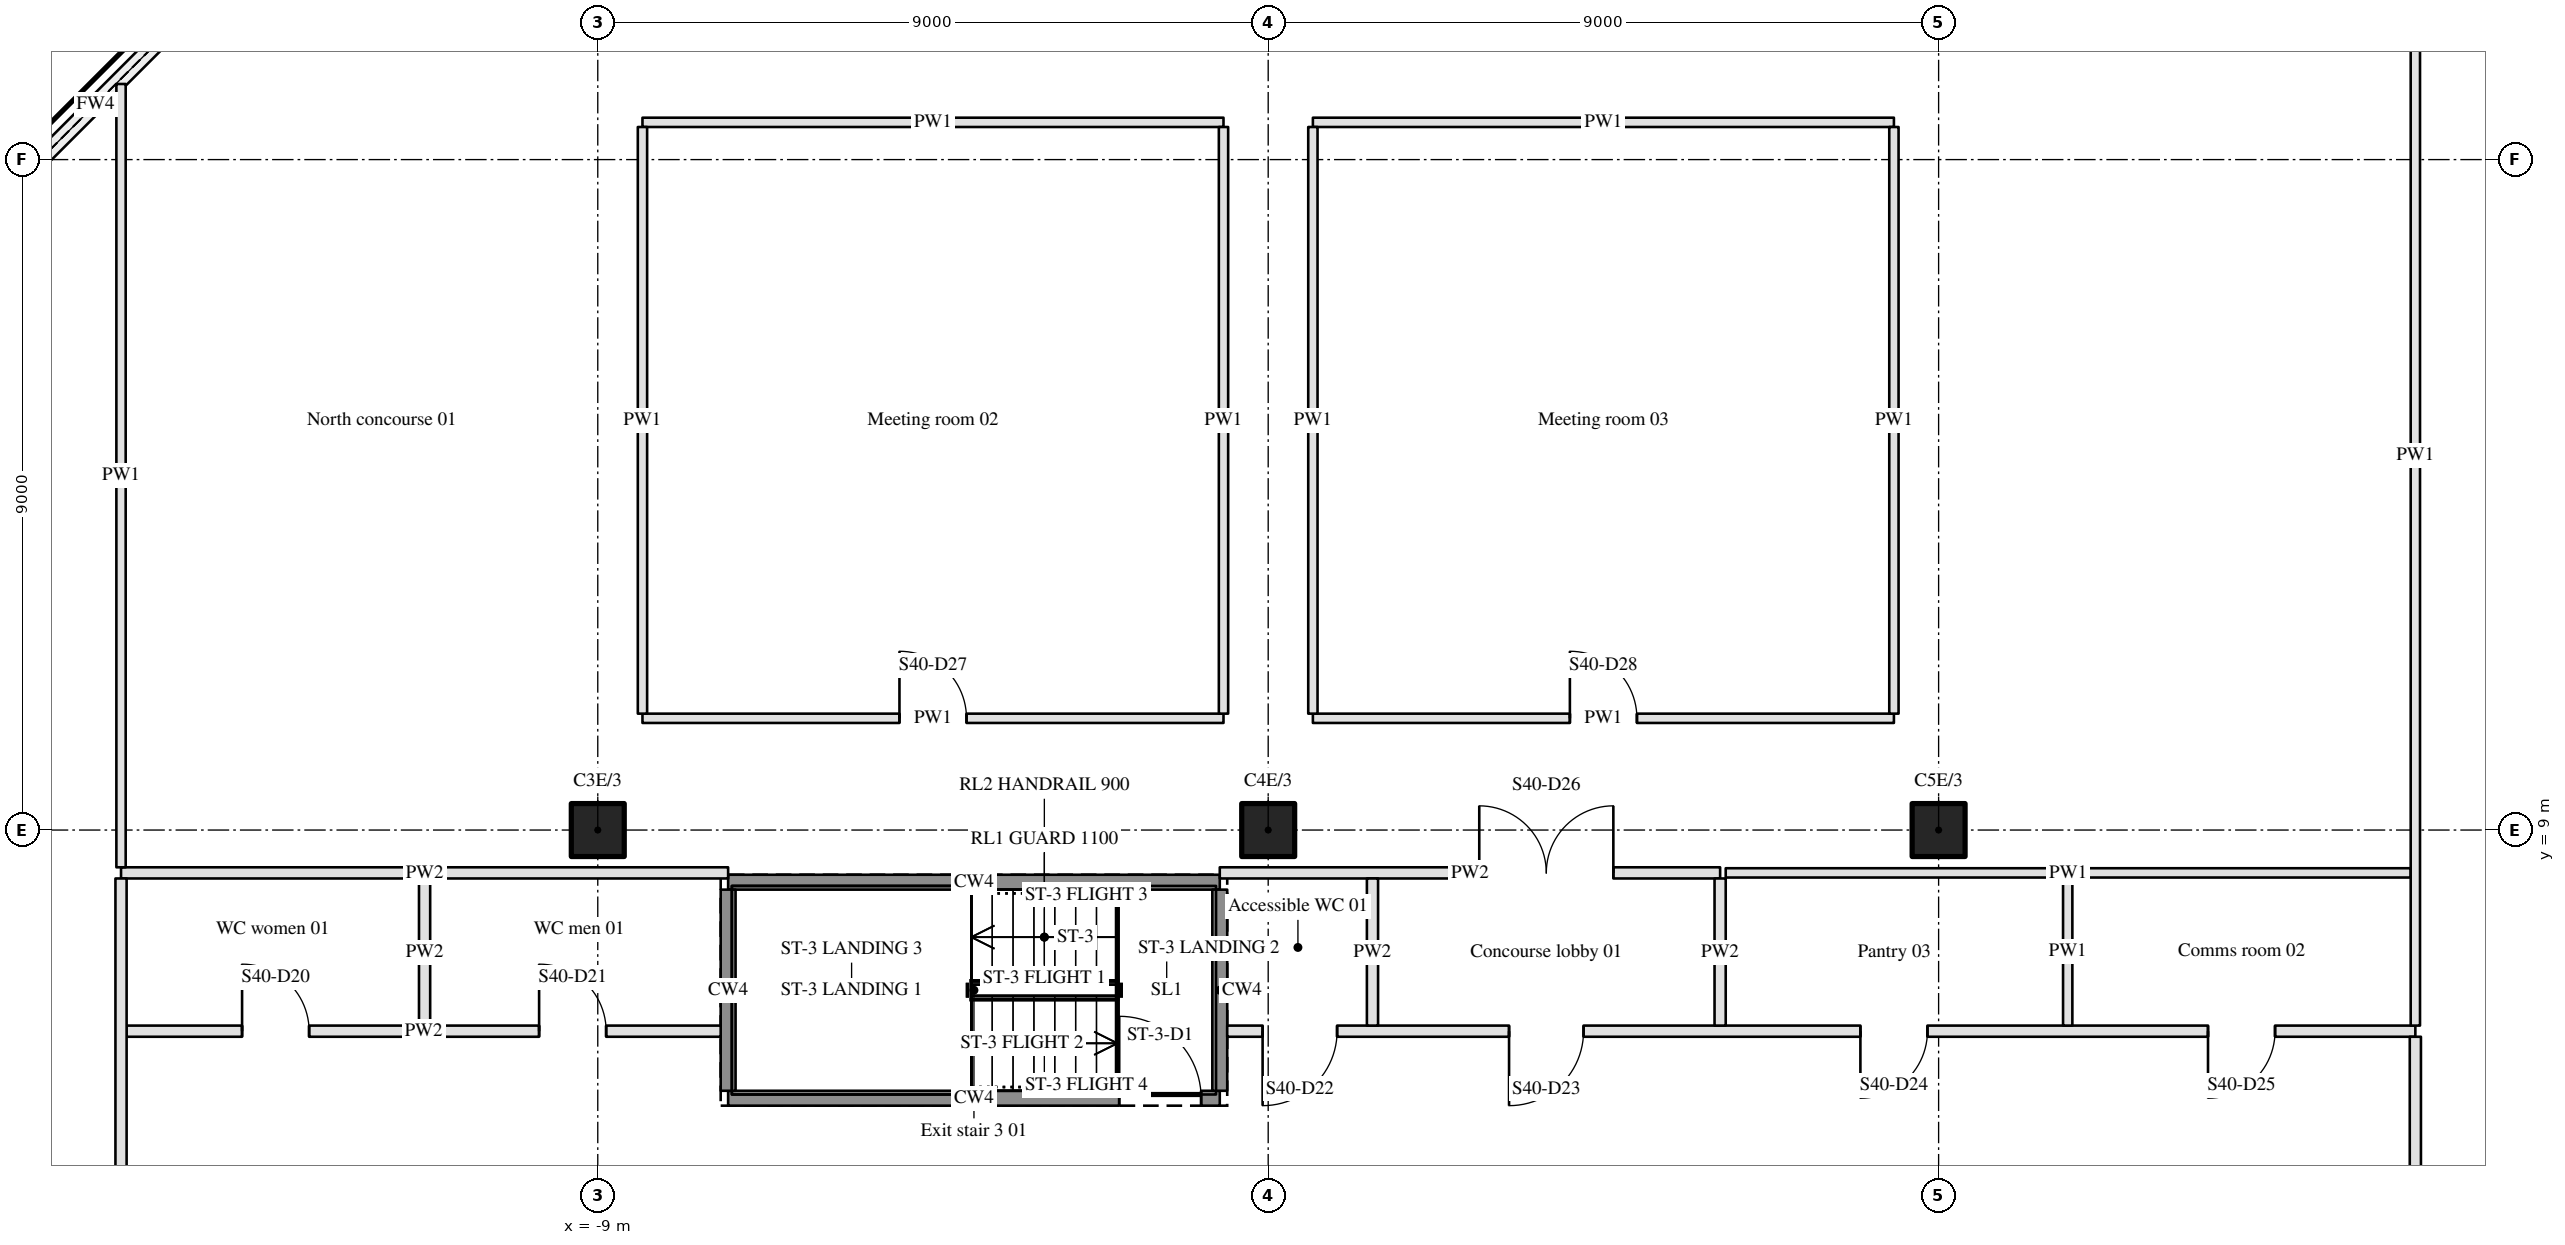
"""IFC4 building model, lengths in metres.
Left out: names, types, materials, properties, quantities, classifications, styles, units other than length and angle.
Written with IfcOpenShell. Run it as: python <this file> out.ifc"""

import sys

from ifc_helpers import new_model, si_unit, direction, frame, frame_2d, origin, origin_2d, place, context, subcontext, project, spatial, rectangle, hollow_circle, extrude, element, fill, save


model = new_model("IFC4")
c1 = context("Model", 3, precision=1e-05, world=origin(), true_north=direction((0.0, 1.0)))
c2 = subcontext(c1, "Body", "Model", "MODEL_VIEW")
j1 = project(units=[si_unit("LENGTHUNIT", "METRE"), si_unit("PLANEANGLEUNIT", "RADIAN")], contexts=[c1])
p1 = place(None, origin())
s1 = spatial("IfcSite", under=j1, at=p1, CompositionType="ELEMENT")
p2 = place(p1, origin())
s2 = spatial("IfcBuilding", under=s1, at=p2, CompositionType="ELEMENT")
p3 = place(p2, frame((0.0, 0.0, 162.3)))
s3 = spatial("IfcBuildingStorey", under=s2, at=p3, CompositionType="ELEMENT", Elevation=162.3)
for number, where, z_axis, x_axis in (
    (1, (-9.0, 9.0, 0.0), (0.0, 0.0, 1.0), (1.0, 0.0, 0.0)),
    (2, (0.0, 9.0, 0.0), (0.0, 0.0, 1.0), (1.0, 0.0, 0.0)),
    (3, (9.0, 9.0, 0.0), (0.0, 0.0, 1.0), (1.0, 0.0, 0.0)),
):
    element("IfcColumn", number, at=place(p3, frame(where, z_axis=z_axis, x_axis=x_axis)), inside=s3, PredefinedType="COLUMN", context=c2, shape_type="SweptSolid", body=[
        extrude(hollow_circle(Radius=0.355, WallThickness=0.032, at=origin_2d()), origin(), (0.0, 0.0, 1.0), 5.4),
    ])
p4 = place(p3, frame((-7.25, 5.4, 0.0), z_axis=(0.0, 0.0, 1.0), x_axis=(1.0, 0.0, 0.0)))
e4 = element("IfcWall", 4, at=p4, inside=s3, PredefinedType="SHEAR", context=c2, shape_type="SweptSolid", body=[
    extrude(rectangle(XDim=6.6, YDim=0.2, at=frame_2d((3.3, 0.0))), origin(), (0.0, 0.0, 1.0), 5.4),
])
p5 = place(p4, frame((5.25, 0.0, 0.0)))
e5 = element("IfcOpeningElement", 5, at=p5, cuts=e4, PredefinedType="OPENING", context=c2, shape_type="SweptSolid", body=[
    extrude(rectangle(XDim=1.1, YDim=2.1, at=frame_2d((0.55, 1.05))), frame((0.0, 0.11, 0.0), z_axis=(0.0, -1.0, 0.0), x_axis=(1.0, 0.0, 0.0)), (0.0, 0.0, 1.0), 0.22),
])
p6 = place(p3, frame((-15.325, 6.3, 0.0), z_axis=(0.0, 0.0, 1.0), x_axis=(1.0, 0.0, 0.0)))
e6 = element("IfcWall", 6, at=p6, inside=s3, PredefinedType="PARTITIONING", context=c2, shape_type="SweptSolid", body=[
    extrude(rectangle(XDim=7.975, YDim=0.15, at=frame_2d((3.987, 0.0))), origin(), (0.0, 0.0, 1.0), 4.46),
])
p7 = place(p6, frame((1.55, 0.0, 0.0)))
e7 = element("IfcOpeningElement", 7, at=p7, cuts=e6, PredefinedType="OPENING", context=c2, shape_type="SweptSolid", body=[
    extrude(rectangle(XDim=0.9, YDim=2.1, at=frame_2d((0.45, 1.05))), frame((0.0, 0.085, 0.0), z_axis=(0.0, -1.0, 0.0), x_axis=(1.0, 0.0, 0.0)), (0.0, 0.0, 1.0), 0.17),
])
p8 = place(p6, frame((5.538, 0.0, 0.0)))
e8 = element("IfcOpeningElement", 8, at=p8, cuts=e6, PredefinedType="OPENING", context=c2, shape_type="SweptSolid", body=[
    extrude(rectangle(XDim=0.9, YDim=2.1, at=frame_2d((0.45, 1.05))), frame((0.0, 0.085, 0.0), z_axis=(0.0, -1.0, 0.0), x_axis=(1.0, 0.0, 0.0)), (0.0, 0.0, 1.0), 0.17),
])
p9 = place(p3, frame((15.4, 6.3, 0.0), z_axis=(0.0, 0.0, 1.0), x_axis=(-1.0, 0.0, 0.0)))
e9 = element("IfcWall", 9, at=p9, inside=s3, PredefinedType="PARTITIONING", context=c2, shape_type="SweptSolid", body=[
    extrude(rectangle(XDim=15.95, YDim=0.15, at=frame_2d((7.975, 0.0))), origin(), (0.0, 0.0, 1.0), 4.46),
])
p10 = place(p9, frame((11.167, 0.0, 0.0)))
e10 = element("IfcOpeningElement", 10, at=p10, cuts=e9, PredefinedType="OPENING", context=c2, shape_type="SweptSolid", body=[
    extrude(rectangle(XDim=1.0, YDim=2.1, at=frame_2d((0.5, 1.05))), frame((0.0, 0.085, 0.0), z_axis=(0.0, -1.0, 0.0), x_axis=(1.0, 0.0, 0.0)), (0.0, 0.0, 1.0), 0.17),
])
p11 = place(p9, frame((14.475, 0.0, 0.0)))
e11 = element("IfcOpeningElement", 11, at=p11, cuts=e9, PredefinedType="OPENING", context=c2, shape_type="SweptSolid", body=[
    extrude(rectangle(XDim=1.0, YDim=2.1, at=frame_2d((0.5, 1.05))), frame((0.0, 0.085, 0.0), z_axis=(0.0, -1.0, 0.0), x_axis=(1.0, 0.0, 0.0)), (0.0, 0.0, 1.0), 0.17),
])
p12 = place(p9, frame((6.55, 0.0, 0.0)))
e12 = element("IfcOpeningElement", 12, at=p12, cuts=e9, PredefinedType="OPENING", context=c2, shape_type="SweptSolid", body=[
    extrude(rectangle(XDim=0.9, YDim=2.1, at=frame_2d((0.45, 1.05))), frame((0.0, 0.085, 0.0), z_axis=(0.0, -1.0, 0.0), x_axis=(1.0, 0.0, 0.0)), (0.0, 0.0, 1.0), 0.17),
])
p13 = place(p9, frame((1.884, 0.0, 0.0)))
e13 = element("IfcOpeningElement", 13, at=p13, cuts=e9, PredefinedType="OPENING", context=c2, shape_type="SweptSolid", body=[
    extrude(rectangle(XDim=0.9, YDim=2.1, at=frame_2d((0.45, 1.05))), frame((0.0, 0.085, 0.0), z_axis=(0.0, -1.0, 0.0), x_axis=(1.0, 0.0, 0.0)), (0.0, 0.0, 1.0), 0.17),
])
p14 = place(p3, frame((-7.25, 8.3, 0.0), z_axis=(0.0, 0.0, 1.0), x_axis=(1.0, 0.0, 0.0)))
e14 = element("IfcWall", 14, at=p14, inside=s3, PredefinedType="SHEAR", context=c2, shape_type="SweptSolid", body=[
    extrude(rectangle(XDim=6.6, YDim=0.2, at=frame_2d((3.3, 0.0))), origin(), (0.0, 0.0, 1.0), 5.4),
])
p15 = place(p3, frame((-15.4, 8.425, 0.0), z_axis=(0.0, 0.0, 1.0), x_axis=(1.0, 0.0, 0.0)))
e15 = element("IfcWall", 15, at=p15, inside=s3, PredefinedType="PARTITIONING", context=c2, shape_type="SweptSolid", body=[
    extrude(rectangle(XDim=8.15, YDim=0.15, at=frame_2d((4.075, 0.0))), origin(), (0.0, 0.0, 1.0), 4.46),
])
p16 = place(p3, frame((-0.65, 8.425, 0.0), z_axis=(0.0, 0.0, 1.0), x_axis=(1.0, 0.0, 0.0)))
e16 = element("IfcWall", 16, at=p16, inside=s3, PredefinedType="PARTITIONING", context=c2, shape_type="SweptSolid", body=[
    extrude(rectangle(XDim=6.717, YDim=0.15, at=frame_2d((3.358, 0.0))), origin(), (0.0, 0.0, 1.0), 4.46),
])
p17 = place(p16, frame((3.483, 0.0, 0.0)))
e17 = element("IfcOpeningElement", 17, at=p17, cuts=e16, PredefinedType="OPENING", context=c2, shape_type="SweptSolid", body=[
    extrude(rectangle(XDim=1.8, YDim=2.1, at=frame_2d((0.9, 1.05))), frame((0.0, 0.085, 0.0), z_axis=(0.0, -1.0, 0.0), x_axis=(1.0, 0.0, 0.0)), (0.0, 0.0, 1.0), 0.17),
])
p18 = place(p3, frame((6.142, 8.425, 0.0), z_axis=(0.0, 0.0, 1.0), x_axis=(1.0, 0.0, 0.0)))
e18 = element("IfcWall", 18, at=p18, inside=s3, PredefinedType="PARTITIONING", context=c2, shape_type="SweptSolid", body=[
    extrude(rectangle(XDim=9.195, YDim=0.125, at=frame_2d((4.598, 0.0))), origin(), (0.0, 0.0, 1.0), 4.46),
])
p19 = place(p3, frame((-8.4, 10.5, 0.0), z_axis=(0.0, 0.0, 1.0), x_axis=(1.0, 0.0, 0.0)))
e19 = element("IfcWall", 19, at=p19, inside=s3, PredefinedType="PARTITIONING", context=c2, shape_type="SweptSolid", body=[
    extrude(rectangle(XDim=7.8, YDim=0.125, at=frame_2d((3.9, 0.0))), origin(), (0.0, 0.0, 1.0), 4.46),
])
p20 = place(p19, frame((3.45, 0.0, 0.0)))
e20 = element("IfcOpeningElement", 20, at=p20, cuts=e19, PredefinedType="OPENING", context=c2, shape_type="SweptSolid", body=[
    extrude(rectangle(XDim=0.9, YDim=2.1, at=frame_2d((0.45, 1.05))), frame((0.0, 0.073, 0.0), z_axis=(0.0, -1.0, 0.0), x_axis=(1.0, 0.0, 0.0)), (0.0, 0.0, 1.0), 0.145),
])
p21 = place(p3, frame((0.6, 10.5, 0.0), z_axis=(0.0, 0.0, 1.0), x_axis=(1.0, 0.0, 0.0)))
e21 = element("IfcWall", 21, at=p21, inside=s3, PredefinedType="PARTITIONING", context=c2, shape_type="SweptSolid", body=[
    extrude(rectangle(XDim=7.8, YDim=0.125, at=frame_2d((3.9, 0.0))), origin(), (0.0, 0.0, 1.0), 4.46),
])
p22 = place(p21, frame((3.45, 0.0, 0.0)))
e22 = element("IfcOpeningElement", 22, at=p22, cuts=e21, PredefinedType="OPENING", context=c2, shape_type="SweptSolid", body=[
    extrude(rectangle(XDim=0.9, YDim=2.1, at=frame_2d((0.45, 1.05))), frame((0.0, 0.073, 0.0), z_axis=(0.0, -1.0, 0.0), x_axis=(1.0, 0.0, 0.0)), (0.0, 0.0, 1.0), 0.145),
])
for number, where, z_axis, x_axis in (
    (23, (-8.4, 18.5, 0.0), (0.0, 0.0, 1.0), (1.0, 0.0, 0.0)),
    (24, (0.6, 18.5, 0.0), (0.0, 0.0, 1.0), (1.0, 0.0, 0.0)),
):
    element("IfcWall", number, at=place(p3, frame(where, z_axis=z_axis, x_axis=x_axis)), inside=s3, PredefinedType="PARTITIONING", context=c2, shape_type="SweptSolid", body=[
        extrude(rectangle(XDim=7.8, YDim=0.125, at=frame_2d((3.9, 0.0))), origin(), (0.0, 0.0, 1.0), 4.46),
    ])
p23 = place(p3, frame((-15.4, 8.35, 0.0), z_axis=(0.0, 0.0, 1.0), x_axis=(0.0, -1.0, 0.0)))
e25 = element("IfcWall", 25, at=p23, inside=s3, PredefinedType="PARTITIONING", context=c2, shape_type="SweptSolid", body=[
    extrude(rectangle(XDim=23.175, YDim=0.15, at=frame_2d((11.587, 0.0))), origin(), (0.0, 0.0, 1.0), 4.46),
])
p24 = place(p23, frame((11.712, 0.0, 0.0)))
e26 = element("IfcOpeningElement", 26, at=p24, cuts=e25, PredefinedType="OPENING", context=c2, shape_type="SweptSolid", body=[
    extrude(rectangle(XDim=1.8, YDim=2.1, at=frame_2d((0.9, 1.05))), frame((0.0, 0.085, 0.0), z_axis=(0.0, -1.0, 0.0), x_axis=(1.0, 0.0, 0.0)), (0.0, 0.0, 1.0), 0.17),
])
p25 = place(p23, frame((9.613, 0.0, 0.0)))
e27 = element("IfcOpeningElement", 27, at=p25, cuts=e25, PredefinedType="OPENING", context=c2, shape_type="SweptSolid", body=[
    extrude(rectangle(XDim=1.8, YDim=2.1, at=frame_2d((0.9, 1.05))), frame((0.0, 0.085, 0.0), z_axis=(0.0, -1.0, 0.0), x_axis=(1.0, 0.0, 0.0)), (0.0, 0.0, 1.0), 0.17),
])
p26 = place(p3, frame((-15.4, 8.5, 0.0), z_axis=(0.0, 0.0, 1.0), x_axis=(0.0, 1.0, 0.0)))
e28 = element("IfcWall", 28, at=p26, inside=s3, PredefinedType="PARTITIONING", context=c2, shape_type="SweptSolid", body=[
    extrude(rectangle(XDim=10.515, YDim=0.125, at=frame_2d((5.257, 0.0))), origin(), (0.0, 0.0, 1.0), 4.46),
])
p27 = place(p3, frame((-11.325, 6.375, 0.0), z_axis=(0.0, 0.0, 1.0), x_axis=(0.0, 1.0, 0.0)))
e29 = element("IfcWall", 29, at=p27, inside=s3, PredefinedType="PARTITIONING", context=c2, shape_type="SweptSolid", body=[
    extrude(rectangle(XDim=1.975, YDim=0.15, at=frame_2d((0.988, 0.0))), origin(), (0.0, 0.0, 1.0), 4.46),
])
p28 = place(p3, frame((-8.4, 10.562, 0.0), z_axis=(0.0, 0.0, 1.0), x_axis=(0.0, 1.0, 0.0)))
e30 = element("IfcWall", 30, at=p28, inside=s3, PredefinedType="PARTITIONING", context=c2, shape_type="SweptSolid", body=[
    extrude(rectangle(XDim=7.875, YDim=0.125, at=frame_2d((3.938, 0.0))), origin(), (0.0, 0.0, 1.0), 4.46),
])
for number, where, z_axis, x_axis in (
    (31, (-7.25, 5.5, 0.0), (0.0, 0.0, 1.0), (0.0, 1.0, 0.0)),
    (32, (-0.65, 5.5, 0.0), (0.0, 0.0, 1.0), (0.0, 1.0, 0.0)),
):
    element("IfcWall", number, at=place(p3, frame(where, z_axis=z_axis, x_axis=x_axis)), inside=s3, PredefinedType="SHEAR", context=c2, shape_type="SweptSolid", body=[
        extrude(rectangle(XDim=2.7, YDim=0.2, at=frame_2d((1.35, 0.0))), origin(), (0.0, 0.0, 1.0), 5.4),
    ])
for number, where, z_axis, x_axis in (
    (33, (-0.6, 10.562, 0.0), (0.0, 0.0, 1.0), (0.0, 1.0, 0.0)),
    (34, (0.6, 10.562, 0.0), (0.0, 0.0, 1.0), (0.0, 1.0, 0.0)),
):
    element("IfcWall", number, at=place(p3, frame(where, z_axis=z_axis, x_axis=x_axis)), inside=s3, PredefinedType="PARTITIONING", context=c2, shape_type="SweptSolid", body=[
        extrude(rectangle(XDim=7.875, YDim=0.125, at=frame_2d((3.938, 0.0))), origin(), (0.0, 0.0, 1.0), 4.46),
    ])
for number, where, z_axis, x_axis in (
    (35, (1.4, 6.375, 0.0), (0.0, 0.0, 1.0), (0.0, 1.0, 0.0)),
    (36, (6.067, 6.375, 0.0), (0.0, 0.0, 1.0), (0.0, 1.0, 0.0)),
):
    element("IfcWall", number, at=place(p3, frame(where, z_axis=z_axis, x_axis=x_axis)), inside=s3, PredefinedType="PARTITIONING", context=c2, shape_type="SweptSolid", body=[
        extrude(rectangle(XDim=1.975, YDim=0.15, at=frame_2d((0.988, 0.0))), origin(), (0.0, 0.0, 1.0), 4.46),
    ])
p29 = place(p3, frame((8.4, 10.562, 0.0), z_axis=(0.0, 0.0, 1.0), x_axis=(0.0, 1.0, 0.0)))
e37 = element("IfcWall", 37, at=p29, inside=s3, PredefinedType="PARTITIONING", context=c2, shape_type="SweptSolid", body=[
    extrude(rectangle(XDim=7.875, YDim=0.125, at=frame_2d((3.938, 0.0))), origin(), (0.0, 0.0, 1.0), 4.46),
])
p30 = place(p3, frame((10.733, 6.375, 0.0), z_axis=(0.0, 0.0, 1.0), x_axis=(0.0, 1.0, 0.0)))
e38 = element("IfcWall", 38, at=p30, inside=s3, PredefinedType="PARTITIONING", context=c2, shape_type="SweptSolid", body=[
    extrude(rectangle(XDim=1.988, YDim=0.125, at=frame_2d((0.994, 0.0))), origin(), (0.0, 0.0, 1.0), 4.46),
])
p31 = place(p3, frame((15.4, -14.825, 0.0), z_axis=(0.0, 0.0, 1.0), x_axis=(0.0, 1.0, 0.0)))
e39 = element("IfcWall", 39, at=p31, inside=s3, PredefinedType="PARTITIONING", context=c2, shape_type="SweptSolid", body=[
    extrude(rectangle(XDim=21.05, YDim=0.15, at=frame_2d((10.525, 0.0))), origin(), (0.0, 0.0, 1.0), 4.46),
])
p32 = place(p31, frame((9.625, 0.0, 0.0)))
e40 = element("IfcOpeningElement", 40, at=p32, cuts=e39, PredefinedType="OPENING", context=c2, shape_type="SweptSolid", body=[
    extrude(rectangle(XDim=1.8, YDim=2.1, at=frame_2d((0.9, 1.05))), frame((0.0, 0.085, 0.0), z_axis=(0.0, -1.0, 0.0), x_axis=(1.0, 0.0, 0.0)), (0.0, 0.0, 1.0), 0.17),
])
p33 = place(p31, frame((11.725, 0.0, 0.0)))
e41 = element("IfcOpeningElement", 41, at=p33, cuts=e39, PredefinedType="OPENING", context=c2, shape_type="SweptSolid", body=[
    extrude(rectangle(XDim=1.8, YDim=2.1, at=frame_2d((0.9, 1.05))), frame((0.0, 0.085, 0.0), z_axis=(0.0, -1.0, 0.0), x_axis=(1.0, 0.0, 0.0)), (0.0, 0.0, 1.0), 0.17),
])
p34 = place(p3, frame((15.4, 6.375, 0.0), z_axis=(0.0, 0.0, 1.0), x_axis=(0.0, 1.0, 0.0)))
e42 = element("IfcWall", 42, at=p34, inside=s3, PredefinedType="PARTITIONING", context=c2, shape_type="SweptSolid", body=[
    extrude(rectangle(XDim=15.299, YDim=0.125, at=frame_2d((7.649, 0.0))), origin(), (0.0, 0.0, 1.0), 4.46),
])
p35 = place(p10, origin())
e43 = element("IfcDoor", 43, at=p35, inside=s3, OperationType="SINGLE_SWING_RIGHT", PredefinedType="DOOR", context=c2, shape_type="SweptSolid", body=[
    extrude(rectangle(XDim=1.0, YDim=2.1, at=frame_2d((0.5, 1.05))), frame((0.0, 0.025, 0.0), z_axis=(0.0, -1.0, 0.0), x_axis=(1.0, 0.0, 0.0)), (0.0, 0.0, 1.0), 0.05),
])
fill(e10, e43)
p36 = place(p17, origin())
e44 = element("IfcDoor", 44, at=p36, inside=s3, OperationType="DOUBLE_DOOR_SINGLE_SWING", PredefinedType="DOOR", context=c2, shape_type="SweptSolid", body=[
    extrude(rectangle(XDim=1.8, YDim=2.1, at=frame_2d((0.9, 1.05))), frame((0.0, 0.025, 0.0), z_axis=(0.0, -1.0, 0.0), x_axis=(1.0, 0.0, 0.0)), (0.0, 0.0, 1.0), 0.05),
])
fill(e17, e44)
p37 = place(p5, origin())
e45 = element("IfcDoor", 45, at=p37, inside=s3, OperationType="SINGLE_SWING_LEFT", PredefinedType="DOOR", context=c2, shape_type="SweptSolid", body=[
    extrude(rectangle(XDim=1.1, YDim=2.1, at=frame_2d((0.55, 1.05))), frame((0.0, 0.025, 0.0), z_axis=(0.0, -1.0, 0.0), x_axis=(1.0, 0.0, 0.0)), (0.0, 0.0, 1.0), 0.05),
])
fill(e5, e45)
p38 = place(p7, origin())
e46 = element("IfcDoor", 46, at=p38, inside=s3, OperationType="SINGLE_SWING_LEFT", PredefinedType="DOOR", context=c2, shape_type="SweptSolid", body=[
    extrude(rectangle(XDim=0.9, YDim=2.1, at=frame_2d((0.45, 1.05))), frame((0.0, 0.025, 0.0), z_axis=(0.0, -1.0, 0.0), x_axis=(1.0, 0.0, 0.0)), (0.0, 0.0, 1.0), 0.05),
])
fill(e7, e46)
p39 = place(p8, origin())
e47 = element("IfcDoor", 47, at=p39, inside=s3, OperationType="SINGLE_SWING_LEFT", PredefinedType="DOOR", context=c2, shape_type="SweptSolid", body=[
    extrude(rectangle(XDim=0.9, YDim=2.1, at=frame_2d((0.45, 1.05))), frame((0.0, 0.025, 0.0), z_axis=(0.0, -1.0, 0.0), x_axis=(1.0, 0.0, 0.0)), (0.0, 0.0, 1.0), 0.05),
])
fill(e8, e47)
p40 = place(p11, origin())
e48 = element("IfcDoor", 48, at=p40, inside=s3, OperationType="SINGLE_SWING_RIGHT", PredefinedType="DOOR", context=c2, shape_type="SweptSolid", body=[
    extrude(rectangle(XDim=1.0, YDim=2.1, at=frame_2d((0.5, 1.05))), frame((0.0, 0.025, 0.0), z_axis=(0.0, -1.0, 0.0), x_axis=(1.0, 0.0, 0.0)), (0.0, 0.0, 1.0), 0.05),
])
fill(e11, e48)
p41 = place(p12, origin())
e49 = element("IfcDoor", 49, at=p41, inside=s3, OperationType="SINGLE_SWING_RIGHT", PredefinedType="DOOR", context=c2, shape_type="SweptSolid", body=[
    extrude(rectangle(XDim=0.9, YDim=2.1, at=frame_2d((0.45, 1.05))), frame((0.0, 0.025, 0.0), z_axis=(0.0, -1.0, 0.0), x_axis=(1.0, 0.0, 0.0)), (0.0, 0.0, 1.0), 0.05),
])
fill(e12, e49)
p42 = place(p13, origin())
e50 = element("IfcDoor", 50, at=p42, inside=s3, OperationType="SINGLE_SWING_RIGHT", PredefinedType="DOOR", context=c2, shape_type="SweptSolid", body=[
    extrude(rectangle(XDim=0.9, YDim=2.1, at=frame_2d((0.45, 1.05))), frame((0.0, 0.025, 0.0), z_axis=(0.0, -1.0, 0.0), x_axis=(1.0, 0.0, 0.0)), (0.0, 0.0, 1.0), 0.05),
])
fill(e13, e50)
p43 = place(p20, origin())
e51 = element("IfcDoor", 51, at=p43, inside=s3, OperationType="SINGLE_SWING_LEFT", PredefinedType="DOOR", context=c2, shape_type="SweptSolid", body=[
    extrude(rectangle(XDim=0.9, YDim=2.1, at=frame_2d((0.45, 1.05))), frame((0.0, 0.025, 0.0), z_axis=(0.0, -1.0, 0.0), x_axis=(1.0, 0.0, 0.0)), (0.0, 0.0, 1.0), 0.05),
])
fill(e20, e51)
p44 = place(p22, origin())
e52 = element("IfcDoor", 52, at=p44, inside=s3, OperationType="SINGLE_SWING_LEFT", PredefinedType="DOOR", context=c2, shape_type="SweptSolid", body=[
    extrude(rectangle(XDim=0.9, YDim=2.1, at=frame_2d((0.45, 1.05))), frame((0.0, 0.025, 0.0), z_axis=(0.0, -1.0, 0.0), x_axis=(1.0, 0.0, 0.0)), (0.0, 0.0, 1.0), 0.05),
])
fill(e22, e52)
save(model, sys.argv[1])
